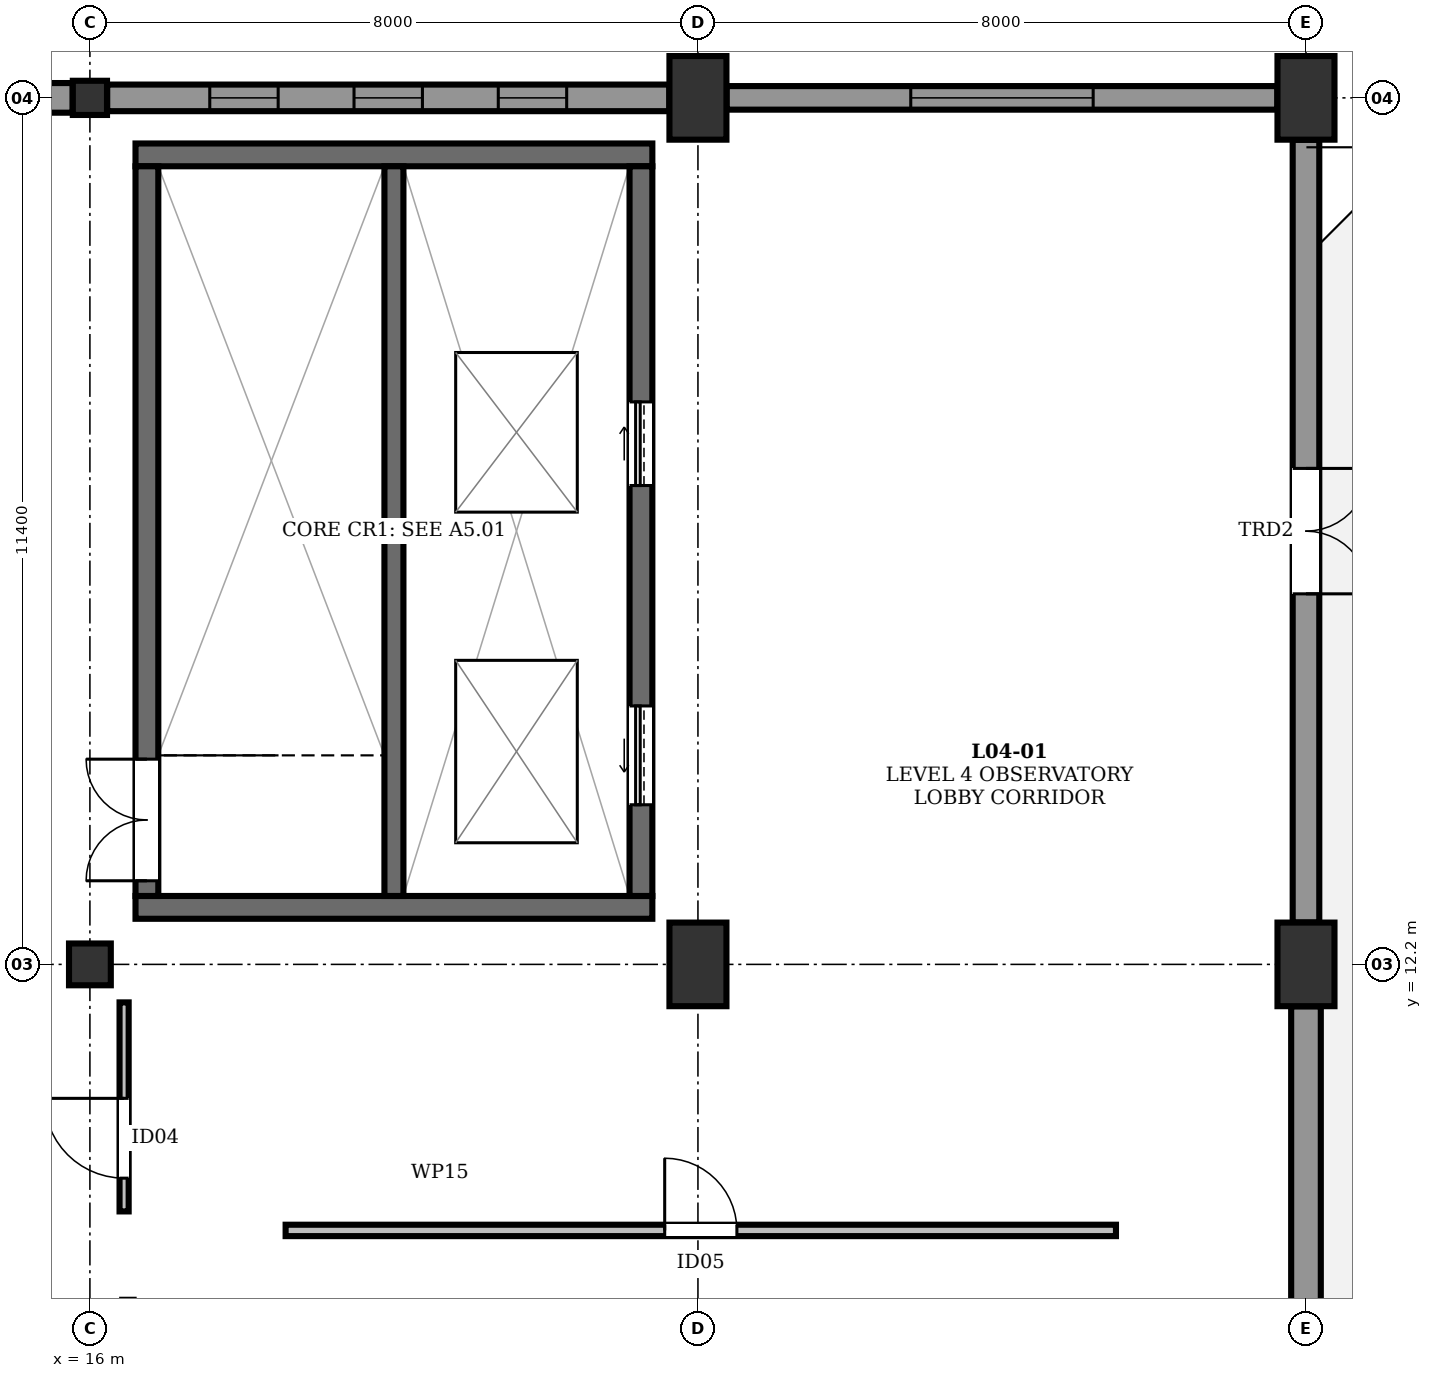
"""IFC4 building model, lengths in metres.
Left out: names, types, materials, properties, quantities, classifications, styles, units other than length and angle.
Written with IfcOpenShell. Run it as: python <this file> out.ifc"""

import sys

from ifc_helpers import new_model, si_unit, direction, frame, frame_2d, origin, origin_2d, place, context, subcontext, project, spatial, rectangle, extrude, element, fill, save


model = new_model("IFC4")
c1 = context("Model", 3, precision=1e-05, world=origin(), true_north=direction((0.0, 1.0)))
c2 = subcontext(c1, "Body", "Model", "MODEL_VIEW")
j1 = project(units=[si_unit("LENGTHUNIT", "METRE"), si_unit("PLANEANGLEUNIT", "RADIAN")], contexts=[c1])
p1 = place(None, origin())
s1 = spatial("IfcSite", under=j1, at=p1, CompositionType="ELEMENT")
p2 = place(p1, origin())
s2 = spatial("IfcBuilding", under=s1, at=p2, CompositionType="ELEMENT")
p3 = place(p2, frame((0.0, 0.0, 19.2)))
s3 = spatial("IfcBuildingStorey", under=s2, at=p3, CompositionType="ELEMENT", Elevation=19.2)
p4 = place(p3, frame((16.0, 12.2, 0.0), z_axis=(0.0, 0.0, 1.0), x_axis=(1.0, 0.0, 0.0)))
e1 = element("IfcColumn", 1, at=p4, inside=s3, PredefinedType="COLUMN", context=c2, shape_type="SweptSolid", body=[
    extrude(rectangle(XDim=0.55, YDim=0.55, at=origin_2d()), origin(), (0.0, 0.0, 1.0), 4.8),
])
p5 = place(p3, frame((16.0, 23.6, 0.0), z_axis=(0.0, 0.0, 1.0), x_axis=(1.0, 0.0, 0.0)))
e2 = element("IfcColumn", 2, at=p5, inside=s3, PredefinedType="COLUMN", context=c2, shape_type="SweptSolid", body=[
    extrude(rectangle(XDim=0.45, YDim=0.45, at=origin_2d()), origin(), (0.0, 0.0, 1.0), 4.8),
])
for number, where, z_axis, x_axis in (
    (3, (24.0, 12.2, 0.0), (0.0, 0.0, 1.0), (1.0, 0.0, 0.0)),
    (4, (24.0, 23.6, 0.0), (0.0, 0.0, 1.0), (1.0, 0.0, 0.0)),
    (5, (32.0, 12.2, 0.0), (0.0, 0.0, 1.0), (1.0, 0.0, 0.0)),
    (6, (32.0, 23.6, 0.0), (0.0, 0.0, 1.0), (1.0, 0.0, 0.0)),
):
    element("IfcColumn", number, at=place(p3, frame(where, z_axis=z_axis, x_axis=x_axis)), inside=s3, PredefinedType="COLUMN", context=c2, shape_type="SweptSolid", body=[
        extrude(rectangle(XDim=0.75, YDim=1.1, at=origin_2d()), origin(), (0.0, 0.0, 1.0), 4.8),
    ])
p6 = place(p3, frame((8.377, 23.6, 0.0), z_axis=(0.0, 0.0, 1.0), x_axis=(1.0, 0.0, 0.0)))
e7 = element("IfcWall", 7, at=p6, inside=s3, PredefinedType="STANDARD", context=c2, shape_type="SweptSolid", body=[
    extrude(rectangle(XDim=7.396, YDim=0.39, at=frame_2d((3.698, 0.0))), origin(), (0.0, 0.0, 1.0), 3.645),
])
p7 = place(p6, frame((1.35, 0.0, 0.75)))
e8 = element("IfcOpeningElement", 8, at=p7, cuts=e7, PredefinedType="OPENING", context=c2, shape_type="SweptSolid", body=[
    extrude(rectangle(XDim=1.75, YDim=1.75, at=frame_2d((0.875, 0.875))), frame((0.0, 0.207, 0.0), z_axis=(0.0, -1.0, 0.0), x_axis=(1.0, 0.0, 0.0)), (0.0, 0.0, 1.0), 0.414),
])
p8 = place(p6, frame((4.296, 0.0, 0.75)))
e9 = element("IfcOpeningElement", 9, at=p8, cuts=e7, PredefinedType="OPENING", context=c2, shape_type="SweptSolid", body=[
    extrude(rectangle(XDim=1.75, YDim=1.75, at=frame_2d((0.875, 0.875))), frame((0.0, 0.207, 0.0), z_axis=(0.0, -1.0, 0.0), x_axis=(1.0, 0.0, 0.0)), (0.0, 0.0, 1.0), 0.414),
])
p9 = place(p3, frame((16.227, 23.6, 0.0), z_axis=(0.0, 0.0, 1.0), x_axis=(1.0, 0.0, 0.0)))
e10 = element("IfcWall", 10, at=p9, inside=s3, PredefinedType="STANDARD", context=c2, shape_type="SweptSolid", body=[
    extrude(rectangle(XDim=7.396, YDim=0.35, at=frame_2d((3.698, 0.0))), origin(), (0.0, 0.0, 1.0), 3.645),
])
p10 = place(p9, frame((1.35, 0.0, 0.75)))
e11 = element("IfcOpeningElement", 11, at=p10, cuts=e10, PredefinedType="OPENING", context=c2, shape_type="SweptSolid", body=[
    extrude(rectangle(XDim=0.9, YDim=2.05, at=frame_2d((0.45, 1.025))), frame((0.0, 0.187, 0.0), z_axis=(0.0, -1.0, 0.0), x_axis=(1.0, 0.0, 0.0)), (0.0, 0.0, 1.0), 0.374),
])
p11 = place(p9, frame((3.248, 0.0, 0.75)))
e12 = element("IfcOpeningElement", 12, at=p11, cuts=e10, PredefinedType="OPENING", context=c2, shape_type="SweptSolid", body=[
    extrude(rectangle(XDim=0.9, YDim=2.05, at=frame_2d((0.45, 1.025))), frame((0.0, 0.187, 0.0), z_axis=(0.0, -1.0, 0.0), x_axis=(1.0, 0.0, 0.0)), (0.0, 0.0, 1.0), 0.374),
])
p12 = place(p9, frame((5.146, 0.0, 0.75)))
e13 = element("IfcOpeningElement", 13, at=p12, cuts=e10, PredefinedType="OPENING", context=c2, shape_type="SweptSolid", body=[
    extrude(rectangle(XDim=0.9, YDim=2.05, at=frame_2d((0.45, 1.025))), frame((0.0, 0.187, 0.0), z_axis=(0.0, -1.0, 0.0), x_axis=(1.0, 0.0, 0.0)), (0.0, 0.0, 1.0), 0.374),
])
p13 = place(p3, frame((24.377, 23.6, 0.0), z_axis=(0.0, 0.0, 1.0), x_axis=(1.0, 0.0, 0.0)))
e14 = element("IfcWall", 14, at=p13, inside=s3, PredefinedType="STANDARD", context=c2, shape_type="SweptSolid", body=[
    extrude(rectangle(XDim=7.246, YDim=0.31, at=frame_2d((3.623, 0.0))), origin(), (0.0, 0.0, 1.0), 3.645),
])
p14 = place(p13, frame((2.423, 0.0, 0.75)))
e15 = element("IfcOpeningElement", 15, at=p14, cuts=e14, PredefinedType="OPENING", context=c2, shape_type="SweptSolid", body=[
    extrude(rectangle(XDim=2.4, YDim=2.05, at=frame_2d((1.2, 1.025))), frame((0.0, 0.167, 0.0), z_axis=(0.0, -1.0, 0.0), x_axis=(1.0, 0.0, 0.0)), (0.0, 0.0, 1.0), 0.334),
])
p15 = place(p3, frame((32.0, 1.352, 0.0), z_axis=(0.0, 0.0, 1.0), x_axis=(0.0, 1.0, 0.0)))
e16 = element("IfcWall", 16, at=p15, inside=s3, PredefinedType="STANDARD", context=c2, shape_type="SweptSolid", body=[
    extrude(rectangle(XDim=10.296, YDim=0.39, at=frame_2d((5.148, 0.0))), origin(), (0.0, 0.0, 1.0), 3.845),
])
p16 = place(p15, frame((4.248, 0.0, 0.0)))
e17 = element("IfcOpeningElement", 17, at=p16, cuts=e16, PredefinedType="OPENING", context=c2, shape_type="SweptSolid", body=[
    extrude(rectangle(XDim=1.8, YDim=2.3, at=frame_2d((0.9, 1.15))), frame((0.0, 0.207, 0.0), z_axis=(0.0, -1.0, 0.0), x_axis=(1.0, 0.0, 0.0)), (0.0, 0.0, 1.0), 0.414),
])
p17 = place(p3, frame((32.0, 12.752, 0.0), z_axis=(0.0, 0.0, 1.0), x_axis=(0.0, 1.0, 0.0)))
e18 = element("IfcWall", 18, at=p17, inside=s3, PredefinedType="STANDARD", context=c2, shape_type="SweptSolid", body=[
    extrude(rectangle(XDim=10.296, YDim=0.35, at=frame_2d((5.148, 0.0))), origin(), (0.0, 0.0, 1.0), 3.845),
])
p18 = place(p17, frame((4.323, 0.0, 0.0)))
e19 = element("IfcOpeningElement", 19, at=p18, cuts=e18, PredefinedType="OPENING", context=c2, shape_type="SweptSolid", body=[
    extrude(rectangle(XDim=1.65, YDim=2.25, at=frame_2d((0.825, 1.125))), frame((0.0, 0.187, 0.0), z_axis=(0.0, -1.0, 0.0), x_axis=(1.0, 0.0, 0.0)), (0.0, 0.0, 1.0), 0.374),
])
for number, where, z_axis, x_axis in (
    (20, (16.6, 12.95, 0.0), (0.0, 0.0, 1.0), (1.0, 0.0, 0.0)),
    (21, (16.6, 22.85, 0.0), (0.0, 0.0, 1.0), (1.0, 0.0, 0.0)),
):
    element("IfcWall", number, at=place(p3, frame(where, z_axis=z_axis, x_axis=x_axis)), inside=s3, PredefinedType="SHEAR", context=c2, shape_type="SweptSolid", body=[
        extrude(rectangle(XDim=6.8, YDim=0.3, at=frame_2d((3.4, 0.0))), origin(), (0.0, 0.0, 1.0), 4.56),
    ])
p19 = place(p3, frame((16.75, 13.1, 0.0), z_axis=(0.0, 0.0, 1.0), x_axis=(0.0, 1.0, 0.0)))
e22 = element("IfcWall", 22, at=p19, inside=s3, PredefinedType="SHEAR", context=c2, shape_type="SweptSolid", body=[
    extrude(rectangle(XDim=9.6, YDim=0.3, at=frame_2d((4.8, 0.0))), origin(), (0.0, 0.0, 1.0), 4.56),
])
p20 = place(p19, frame((0.2, 0.0, 0.0)))
e23 = element("IfcOpeningElement", 23, at=p20, cuts=e22, PredefinedType="OPENING", context=c2, shape_type="SweptSolid", body=[
    extrude(rectangle(XDim=1.6, YDim=2.2, at=frame_2d((0.8, 1.1))), frame((0.0, 0.162, 0.0), z_axis=(0.0, -1.0, 0.0), x_axis=(1.0, 0.0, 0.0)), (0.0, 0.0, 1.0), 0.324),
])
p21 = place(p3, frame((23.25, 13.1, 0.0), z_axis=(0.0, 0.0, 1.0), x_axis=(0.0, 1.0, 0.0)))
e24 = element("IfcWall", 24, at=p21, inside=s3, PredefinedType="SHEAR", context=c2, shape_type="SweptSolid", body=[
    extrude(rectangle(XDim=9.6, YDim=0.3, at=frame_2d((4.8, 0.0))), origin(), (0.0, 0.0, 1.0), 4.56),
])
p22 = place(p21, frame((1.2, 0.0, 0.0)))
e25 = element("IfcOpeningElement", 25, at=p22, cuts=e24, PredefinedType="OPENING", context=c2, shape_type="SweptSolid", body=[
    extrude(rectangle(XDim=1.3, YDim=2.2, at=frame_2d((0.65, 1.1))), frame((0.0, 0.162, 0.0), z_axis=(0.0, -1.0, 0.0), x_axis=(1.0, 0.0, 0.0)), (0.0, 0.0, 1.0), 0.324),
])
p23 = place(p21, frame((5.4, 0.0, 0.0)))
e26 = element("IfcOpeningElement", 26, at=p23, cuts=e24, PredefinedType="OPENING", context=c2, shape_type="SweptSolid", body=[
    extrude(rectangle(XDim=1.1, YDim=2.2, at=frame_2d((0.55, 1.1))), frame((0.0, 0.162, 0.0), z_axis=(0.0, -1.0, 0.0), x_axis=(1.0, 0.0, 0.0)), (0.0, 0.0, 1.0), 0.324),
])
p24 = place(p3, frame((20.0, 13.1, 0.0), z_axis=(0.0, 0.0, 1.0), x_axis=(0.0, 1.0, 0.0)))
e27 = element("IfcWall", 27, at=p24, inside=s3, PredefinedType="SHEAR", context=c2, shape_type="SweptSolid", body=[
    extrude(rectangle(XDim=9.6, YDim=0.25, at=frame_2d((4.8, 0.0))), origin(), (0.0, 0.0, 1.0), 4.56),
])
p25 = place(p3, frame((16.45, 8.95, 0.0), z_axis=(0.0, 0.0, 1.0), x_axis=(0.0, 1.0, 0.0)))
e28 = element("IfcWall", 28, at=p25, inside=s3, PredefinedType="PARTITIONING", context=c2, shape_type="SweptSolid", body=[
    extrude(rectangle(XDim=2.75, YDim=0.12, at=frame_2d((1.375, 0.0))), origin(), (0.0, 0.0, 1.0), 3.845),
])
p26 = place(p25, frame((0.438, 0.0, 0.0)))
e29 = element("IfcOpeningElement", 29, at=p26, cuts=e28, PredefinedType="OPENING", context=c2, shape_type="SweptSolid", body=[
    extrude(rectangle(XDim=1.05, YDim=2.15, at=frame_2d((0.525, 1.075))), frame((0.0, 0.072, 0.0), z_axis=(0.0, -1.0, 0.0), x_axis=(1.0, 0.0, 0.0)), (0.0, 0.0, 1.0), 0.144),
])
p27 = place(p3, frame((18.575, 8.7, 0.0), z_axis=(0.0, 0.0, 1.0), x_axis=(1.0, 0.0, 0.0)))
e30 = element("IfcWall", 30, at=p27, inside=s3, PredefinedType="PARTITIONING", context=c2, shape_type="SweptSolid", body=[
    extrude(rectangle(XDim=10.925, YDim=0.15, at=frame_2d((5.462, 0.0))), origin(), (0.0, 0.0, 1.0), 3.845),
])
p28 = place(p27, frame((4.988, 0.0, 0.0)))
e31 = element("IfcOpeningElement", 31, at=p28, cuts=e30, PredefinedType="OPENING", context=c2, shape_type="SweptSolid", body=[
    extrude(rectangle(XDim=0.95, YDim=2.15, at=frame_2d((0.475, 1.075))), frame((0.0, 0.087, 0.0), z_axis=(0.0, -1.0, 0.0), x_axis=(1.0, 0.0, 0.0)), (0.0, 0.0, 1.0), 0.174),
])
p29 = place(p10, origin())
e32 = element("IfcWindow", 32, at=p29, inside=s3, PartitioningType="SINGLE_PANEL", PredefinedType="WINDOW", context=c2, shape_type="SweptSolid", body=[
    extrude(rectangle(XDim=0.9, YDim=2.05, at=frame_2d((0.45, 1.025))), frame((0.0, 0.08, 0.0), z_axis=(0.0, -1.0, 0.0), x_axis=(1.0, 0.0, 0.0)), (0.0, 0.0, 1.0), 0.06),
])
fill(e11, e32)
p30 = place(p11, origin())
e33 = element("IfcWindow", 33, at=p30, inside=s3, PartitioningType="SINGLE_PANEL", PredefinedType="WINDOW", context=c2, shape_type="SweptSolid", body=[
    extrude(rectangle(XDim=0.9, YDim=2.05, at=frame_2d((0.45, 1.025))), frame((0.0, 0.08, 0.0), z_axis=(0.0, -1.0, 0.0), x_axis=(1.0, 0.0, 0.0)), (0.0, 0.0, 1.0), 0.06),
])
fill(e12, e33)
p31 = place(p12, origin())
e34 = element("IfcWindow", 34, at=p31, inside=s3, PartitioningType="SINGLE_PANEL", PredefinedType="WINDOW", context=c2, shape_type="SweptSolid", body=[
    extrude(rectangle(XDim=0.9, YDim=2.05, at=frame_2d((0.45, 1.025))), frame((0.0, 0.08, 0.0), z_axis=(0.0, -1.0, 0.0), x_axis=(1.0, 0.0, 0.0)), (0.0, 0.0, 1.0), 0.06),
])
fill(e13, e34)
p32 = place(p14, origin())
e35 = element("IfcWindow", 35, at=p32, inside=s3, PartitioningType="TRIPLE_PANEL_VERTICAL", PredefinedType="WINDOW", context=c2, shape_type="SweptSolid", body=[
    extrude(rectangle(XDim=2.4, YDim=2.05, at=frame_2d((1.2, 1.025))), frame((0.0, 0.08, 0.0), z_axis=(0.0, -1.0, 0.0), x_axis=(1.0, 0.0, 0.0)), (0.0, 0.0, 1.0), 0.06),
])
fill(e15, e35)
p33 = place(p18, frame((1.65, 0.0, 0.0), z_axis=(0.0, 0.0, 1.0), x_axis=(-1.0, 0.0, 0.0)))
e36 = element("IfcDoor", 36, at=p33, inside=s3, OperationType="DOUBLE_DOOR_SINGLE_SWING", PredefinedType="DOOR", context=c2, shape_type="SweptSolid", body=[
    extrude(rectangle(XDim=1.65, YDim=2.25, at=frame_2d((0.825, 1.125))), frame((0.0, 0.025, 0.0), z_axis=(0.0, -1.0, 0.0), x_axis=(1.0, 0.0, 0.0)), (0.0, 0.0, 1.0), 0.05),
])
fill(e19, e36)
p34 = place(p20, origin())
e37 = element("IfcDoor", 37, at=p34, inside=s3, OperationType="DOUBLE_DOOR_SINGLE_SWING", PredefinedType="DOOR", context=c2, shape_type="SweptSolid", body=[
    extrude(rectangle(XDim=1.6, YDim=2.2, at=frame_2d((0.8, 1.1))), frame((0.0, 0.025, 0.0), z_axis=(0.0, -1.0, 0.0), x_axis=(1.0, 0.0, 0.0)), (0.0, 0.0, 1.0), 0.05),
])
fill(e23, e37)
p35 = place(p22, origin())
e38 = element("IfcDoor", 38, at=p35, inside=s3, OperationType="SLIDING_TO_LEFT", PredefinedType="DOOR", context=c2, shape_type="SweptSolid", body=[
    extrude(rectangle(XDim=1.3, YDim=2.2, at=frame_2d((0.65, 1.1))), frame((0.0, 0.025, 0.0), z_axis=(0.0, -1.0, 0.0), x_axis=(1.0, 0.0, 0.0)), (0.0, 0.0, 1.0), 0.05),
])
fill(e25, e38)
p36 = place(p23, origin())
e39 = element("IfcDoor", 39, at=p36, inside=s3, OperationType="SLIDING_TO_RIGHT", PredefinedType="DOOR", context=c2, shape_type="SweptSolid", body=[
    extrude(rectangle(XDim=1.1, YDim=2.2, at=frame_2d((0.55, 1.1))), frame((0.0, 0.025, 0.0), z_axis=(0.0, -1.0, 0.0), x_axis=(1.0, 0.0, 0.0)), (0.0, 0.0, 1.0), 0.05),
])
fill(e26, e39)
p37 = place(p26, origin())
e40 = element("IfcDoor", 40, at=p37, inside=s3, OperationType="SINGLE_SWING_RIGHT", PredefinedType="DOOR", context=c2, shape_type="SweptSolid", body=[
    extrude(rectangle(XDim=1.05, YDim=2.15, at=frame_2d((0.525, 1.075))), frame((0.0, 0.025, 0.0), z_axis=(0.0, -1.0, 0.0), x_axis=(1.0, 0.0, 0.0)), (0.0, 0.0, 1.0), 0.05),
])
fill(e29, e40)
p38 = place(p28, origin())
e41 = element("IfcDoor", 41, at=p38, inside=s3, OperationType="SINGLE_SWING_LEFT", PredefinedType="DOOR", context=c2, shape_type="SweptSolid", body=[
    extrude(rectangle(XDim=0.95, YDim=2.15, at=frame_2d((0.475, 1.075))), frame((0.0, 0.025, 0.0), z_axis=(0.0, -1.0, 0.0), x_axis=(1.0, 0.0, 0.0)), (0.0, 0.0, 1.0), 0.05),
])
fill(e31, e41)
save(model, sys.argv[1])
